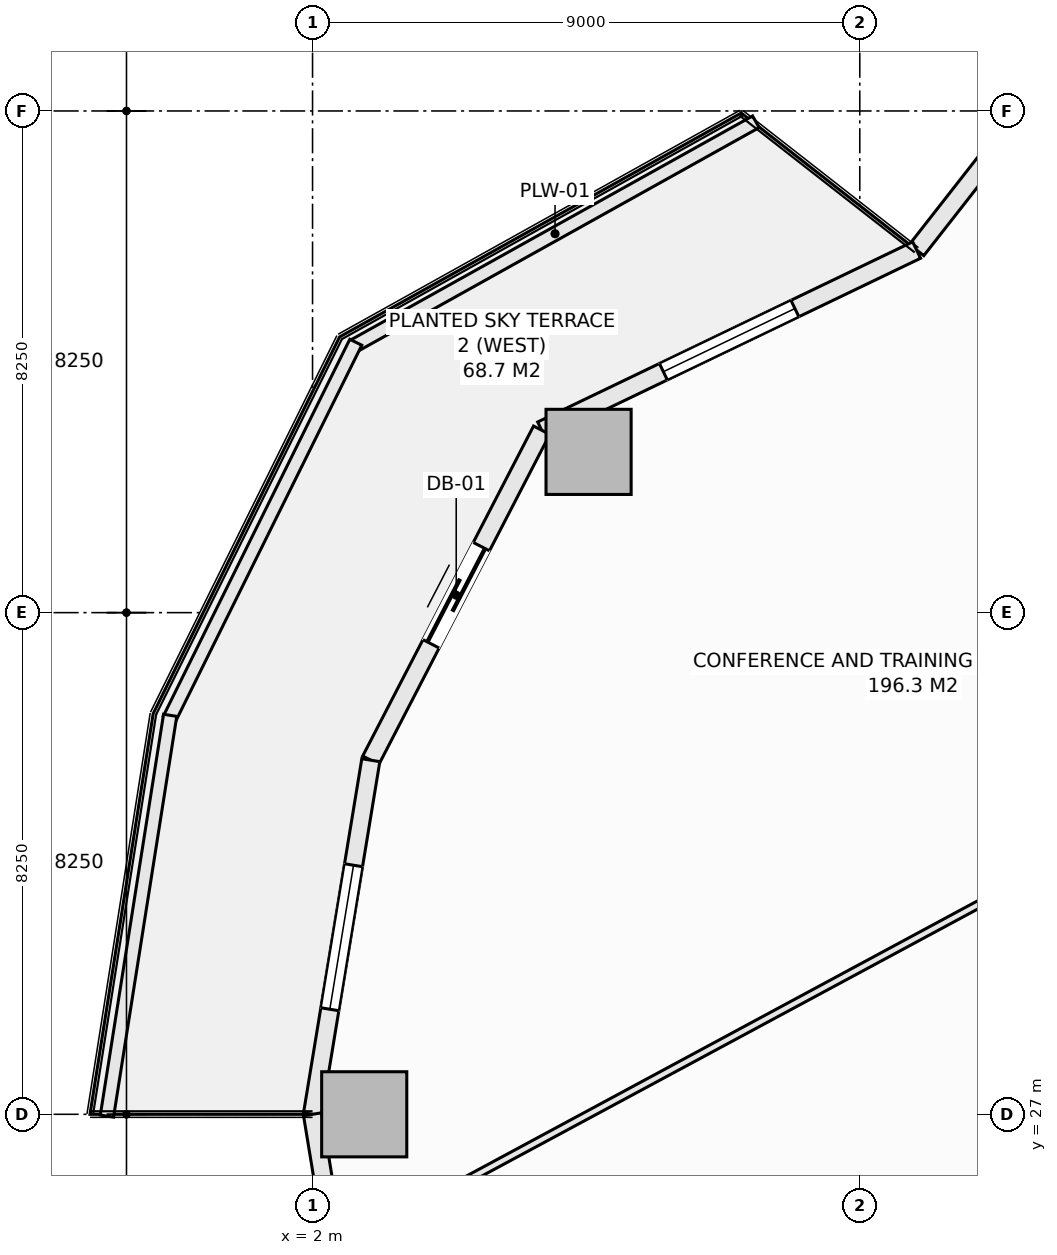
"""IFC4 building model, lengths in metres.
Left out: names, types, materials, properties, quantities, classifications, styles, units other than length and angle.
Written with IfcOpenShell. Run it as: python <this file> out.ifc"""

import sys

from ifc_helpers import new_model, si_unit, direction, frame, frame_2d, origin, origin_2d, place, context, subcontext, project, spatial, rectangle, extrude, element, fill, save


model = new_model("IFC4")
c1 = context("Model", 3, precision=1e-05, world=origin(), true_north=direction((0.0, 1.0)))
c2 = subcontext(c1, "Body", "Model", "MODEL_VIEW")
j1 = project(units=[si_unit("LENGTHUNIT", "METRE"), si_unit("PLANEANGLEUNIT", "RADIAN")], contexts=[c1])
p1 = place(None, origin())
s1 = spatial("IfcSite", under=j1, at=p1, CompositionType="ELEMENT")
p2 = place(p1, origin())
s2 = spatial("IfcBuilding", under=s1, at=p2, CompositionType="ELEMENT")
p3 = place(p2, frame((0.0, 0.0, 34.2)))
s3 = spatial("IfcBuildingStorey", under=s2, at=p3, CompositionType="ELEMENT", Elevation=34.2)
for number, where, z_axis, x_axis in (
    (1, (6.54, 37.894, -0.28), (0.0, 0.0, 1.0), (1.0, 0.0, 0.0)),
    (2, (2.85, 27.0, -0.28), (0.0, 0.0, 1.0), (1.0, 0.0, 0.0)),
):
    element("IfcColumn", number, at=place(p3, frame(where, z_axis=z_axis, x_axis=x_axis)), inside=s3, PredefinedType="COLUMN", context=c2, shape_type="SweptSolid", body=[
        extrude(rectangle(XDim=1.4, YDim=1.4, at=origin_2d()), origin(), (0.0, 0.0, 1.0), 3.85),
    ])
p4 = place(p3, frame((11.935, 41.213, 0.0), z_axis=(0.0, 0.0, 1.0), x_axis=(0.616421309777, 0.787416515482, 0.0)))
e3 = element("IfcWall", 3, at=p4, inside=s3, PredefinedType="SOLIDWALL", context=c2, shape_type="SweptSolid", body=[
    extrude(rectangle(XDim=6.696, YDim=0.3, at=frame_2d((3.348, 0.0))), origin(), (0.0, 0.0, 1.0), 3.093),
])
p5 = place(p4, frame((2.65, 0.0, 0.85)))
e4 = element("IfcOpeningElement", 4, at=p5, cuts=e3, PredefinedType="OPENING", context=c2, shape_type="SweptSolid", body=[
    extrude(rectangle(XDim=2.4, YDim=1.9, at=frame_2d((1.2, 0.95))), frame((0.0, 0.16, 0.0), z_axis=(0.0, -1.0, 0.0), x_axis=(1.0, 0.0, 0.0)), (0.0, 0.0, 1.0), 0.32),
])
p6 = place(p3, frame((5.768, 38.25, 0.0), z_axis=(0.0, 0.0, 1.0), x_axis=(0.901360393999, 0.433069786673, 0.0)))
e5 = element("IfcWall", 5, at=p6, inside=s3, PredefinedType="SOLIDWALL", context=c2, shape_type="SweptSolid", body=[
    extrude(rectangle(XDim=6.842, YDim=0.3, at=frame_2d((3.421, 0.0))), origin(), (0.0, 0.0, 1.0), 3.093),
])
p7 = place(p6, frame((2.221, 0.0, 0.85)))
e6 = element("IfcOpeningElement", 6, at=p7, cuts=e5, PredefinedType="OPENING", context=c2, shape_type="SweptSolid", body=[
    extrude(rectangle(XDim=2.4, YDim=1.9, at=frame_2d((1.2, 0.95))), frame((0.0, 0.16, 0.0), z_axis=(0.0, -1.0, 0.0), x_axis=(1.0, 0.0, 0.0)), (0.0, 0.0, 1.0), 0.32),
])
p8 = place(p3, frame((2.958, 32.823, 0.0), z_axis=(0.0, 0.0, 1.0), x_axis=(0.459809804413, 0.88801742312, 0.0)))
e7 = element("IfcWall", 7, at=p8, inside=s3, PredefinedType="SOLIDWALL", context=c2, shape_type="SweptSolid", body=[
    extrude(rectangle(XDim=6.111, YDim=0.3, at=frame_2d((3.055, 0.0))), origin(), (0.0, 0.0, 1.0), 3.093),
])
p9 = place(p8, frame((2.155, 0.0, 0.0)))
e8 = element("IfcOpeningElement", 8, at=p9, cuts=e7, PredefinedType="OPENING", context=c2, shape_type="SweptSolid", body=[
    extrude(rectangle(XDim=1.8, YDim=2.25, at=frame_2d((0.9, 1.125))), frame((0.0, 0.16, 0.0), z_axis=(0.0, -1.0, 0.0), x_axis=(1.0, 0.0, 0.0)), (0.0, 0.0, 1.0), 0.32),
])
p10 = place(p3, frame((2.0, 27.0, 0.0), z_axis=(0.0, 0.0, 1.0), x_axis=(0.162366057843, 0.98673059305, 0.0)))
e9 = element("IfcWall", 9, at=p10, inside=s3, PredefinedType="SOLIDWALL", context=c2, shape_type="SweptSolid", body=[
    extrude(rectangle(XDim=5.902, YDim=0.3, at=frame_2d((2.951, 0.0))), origin(), (0.0, 0.0, 1.0), 3.093),
])
p11 = place(p10, frame((1.751, 0.0, 0.85)))
e10 = element("IfcOpeningElement", 10, at=p11, cuts=e9, PredefinedType="OPENING", context=c2, shape_type="SweptSolid", body=[
    extrude(rectangle(XDim=2.4, YDim=1.9, at=frame_2d((1.2, 0.95))), frame((0.0, 0.16, 0.0), z_axis=(0.0, -1.0, 0.0), x_axis=(1.0, 0.0, 0.0)), (0.0, 0.0, 1.0), 0.32),
])
p12 = place(p3, frame((2.0, 27.0, 0.0), z_axis=(0.0, 0.0, 1.0), x_axis=(0.162366057843, -0.98673059305, 0.0)))
e11 = element("IfcWall", 11, at=p12, inside=s3, PredefinedType="SOLIDWALL", context=c2, shape_type="SweptSolid", body=[
    extrude(rectangle(XDim=5.902, YDim=0.3, at=frame_2d((2.951, 0.0))), origin(), (0.0, 0.0, 1.0), 3.093),
])
p13 = place(p12, frame((2.45, 0.0, 0.85)))
e12 = element("IfcOpeningElement", 12, at=p13, cuts=e11, PredefinedType="OPENING", context=c2, shape_type="SweptSolid", body=[
    extrude(rectangle(XDim=2.4, YDim=1.9, at=frame_2d((1.2, 0.95))), frame((0.0, 0.16, 0.0), z_axis=(0.0, -1.0, 0.0), x_axis=(1.0, 0.0, 0.0)), (0.0, 0.0, 1.0), 0.32),
])
p14 = place(p3, frame((2.685, 39.641, 0.0), z_axis=(0.0, 0.0, 1.0), x_axis=(0.873500119739, 0.48682393205, 0.0)))
e13 = element("IfcWall", 13, at=p14, inside=s3, PredefinedType="PARAPET", context=c2, shape_type="SweptSolid", body=[
    extrude(rectangle(XDim=7.562, YDim=0.22, at=frame_2d((3.781, 0.0))), origin(), (0.0, 0.0, 1.0), 0.52),
])
p15 = place(p3, frame((-0.354, 33.502, 0.0), z_axis=(0.0, 0.0, 1.0), x_axis=(0.443578479433, 0.8962355341, 0.0)))
e14 = element("IfcWall", 14, at=p15, inside=s3, PredefinedType="PARAPET", context=c2, shape_type="SweptSolid", body=[
    extrude(rectangle(XDim=6.911, YDim=0.22, at=frame_2d((3.456, 0.0))), origin(), (0.0, 0.0, 1.0), 0.52),
])
p16 = place(p3, frame((-1.382, 26.971, 0.0), z_axis=(0.0, 0.0, 1.0), x_axis=(0.155842315528, 0.987781945923, 0.0)))
e15 = element("IfcWall", 15, at=p16, inside=s3, PredefinedType="PARAPET", context=c2, shape_type="SweptSolid", body=[
    extrude(rectangle(XDim=6.672, YDim=0.22, at=frame_2d((3.336, 0.0))), origin(), (0.0, 0.0, 1.0), 0.52),
])
p17 = place(p3, frame((2.511, 24.829, 0.0), z_axis=(0.0, 0.0, 1.0), x_axis=(0.880496447335, 0.474052746253, 0.0)))
e16 = element("IfcWall", 16, at=p17, inside=s3, PredefinedType="PARTITIONING", context=c2, shape_type="SweptSolid", body=[
    extrude(rectangle(XDim=12.989, YDim=0.12, at=frame_2d((6.495, 0.0))), origin(), (0.0, 0.0, 1.0), 2.934),
])
p18 = place(p7, origin())
e17 = element("IfcWindow", 17, at=p18, inside=s3, PartitioningType="SINGLE_PANEL", PredefinedType="WINDOW", context=c2, shape_type="SweptSolid", body=[
    extrude(rectangle(XDim=2.4, YDim=1.9, at=frame_2d((1.2, 0.95))), frame((0.0, 0.03, 0.0), z_axis=(0.0, -1.0, 0.0), x_axis=(1.0, 0.0, 0.0)), (0.0, 0.0, 1.0), 0.06),
])
fill(e6, e17)
p19 = place(p9, origin())
e18 = element("IfcDoor", 18, at=p19, inside=s3, OperationType="SLIDING_TO_LEFT", PredefinedType="DOOR", context=c2, shape_type="SweptSolid", body=[
    extrude(rectangle(XDim=1.8, YDim=2.25, at=frame_2d((0.9, 1.125))), frame((0.0, 0.025, 0.0), z_axis=(0.0, -1.0, 0.0), x_axis=(1.0, 0.0, 0.0)), (0.0, 0.0, 1.0), 0.05),
])
fill(e8, e18)
p20 = place(p11, origin())
e19 = element("IfcWindow", 19, at=p20, inside=s3, PartitioningType="SINGLE_PANEL", PredefinedType="WINDOW", context=c2, shape_type="SweptSolid", body=[
    extrude(rectangle(XDim=2.4, YDim=1.9, at=frame_2d((1.2, 0.95))), frame((0.0, 0.03, 0.0), z_axis=(0.0, -1.0, 0.0), x_axis=(1.0, 0.0, 0.0)), (0.0, 0.0, 1.0), 0.06),
])
fill(e10, e19)
save(model, sys.argv[1])
